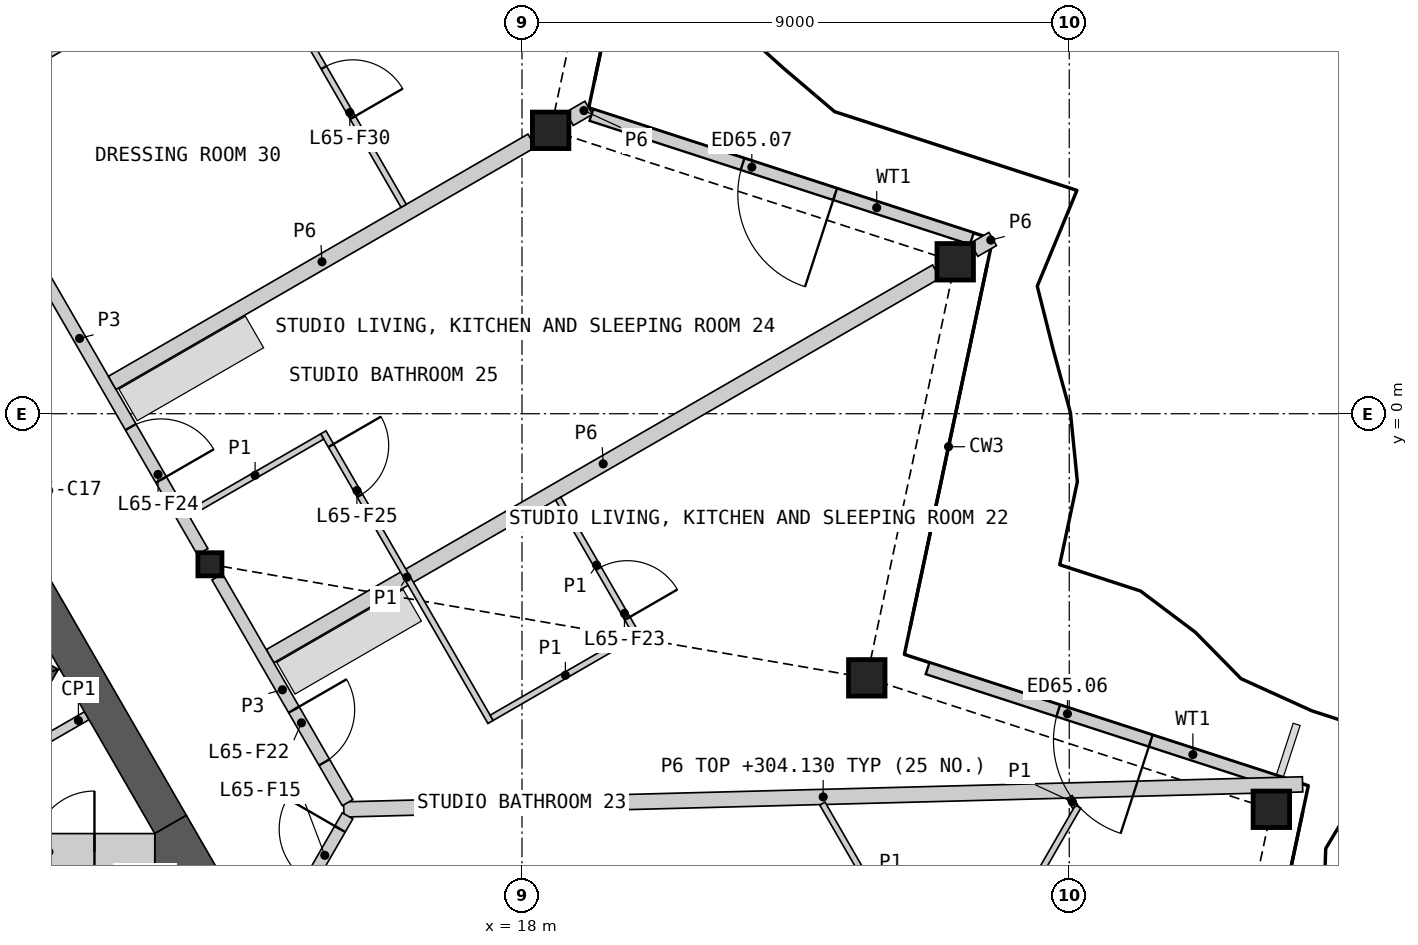
"""IFC4 building model, lengths in metres.
Left out: names, types, materials, properties, quantities, classifications, styles, units other than length and angle.
Written with IfcOpenShell. Run it as: python <this file> out.ifc"""

import sys

from ifc_helpers import new_model, si_unit, direction, frame, frame_2d, origin, origin_2d, place, context, subcontext, project, spatial, polyline, rectangle, hollow_rectangle, i_section, outline, extrude, element, fill, save


model = new_model("IFC4")
c1 = context("Model", 3, precision=1e-05, world=origin(), true_north=direction((0.0, 1.0)))
c2 = subcontext(c1, "Body", "Model", "MODEL_VIEW")
j1 = project(units=[si_unit("LENGTHUNIT", "METRE"), si_unit("PLANEANGLEUNIT", "RADIAN")], contexts=[c1])
p1 = place(None, origin())
s1 = spatial("IfcSite", under=j1, at=p1, CompositionType="ELEMENT")
p2 = place(p1, origin())
s2 = spatial("IfcBuilding", under=s1, at=p2, CompositionType="ELEMENT")
p3 = place(p2, frame((0.0, 0.0, 301.8)))
s3 = spatial("IfcBuildingStorey", under=s2, at=p3, CompositionType="ELEMENT", Elevation=301.8)
for number, where, z_axis, x_axis in (
    (1, (30.324, -6.506, 0.0), (0.0, 0.0, 1.0), (1.0, 0.0, 0.0)),
    (2, (23.67, -4.344, 0.0), (0.0, 0.0, 1.0), (1.0, 0.0, 0.0)),
    (3, (25.125, 2.499, 0.0), (0.0, 0.0, 1.0), (1.0, 0.0, 0.0)),
    (4, (18.471, 4.661, 0.0), (0.0, 0.0, 1.0), (1.0, 0.0, 0.0)),
):
    element("IfcColumn", number, at=place(p3, frame(where, z_axis=z_axis, x_axis=x_axis)), inside=s3, PredefinedType="COLUMN", context=c2, shape_type="SweptSolid", body=[
        extrude(hollow_rectangle(XDim=0.6, YDim=0.6, WallThickness=0.04, at=origin_2d()), origin(), (0.0, 0.0, 1.0), 3.4),
    ])
p4 = place(p3, frame((12.868, -2.476, 0.0), z_axis=(0.0, 0.0, 1.0), x_axis=(1.0, 0.0, 0.0)))
e5 = element("IfcColumn", 5, at=p4, inside=s3, PredefinedType="COLUMN", context=c2, shape_type="SweptSolid", body=[
    extrude(i_section(OverallWidth=0.396, OverallDepth=0.381, WebThickness=0.019, FlangeThickness=0.03, at=origin_2d()), origin(), (0.0, 0.0, 1.0), 3.4),
])
p5 = place(p3, frame((30.488, -6.078, 0.0), z_axis=(0.0, 0.0, 1.0), x_axis=(-0.951062515241, 0.308998530908, 0.0)))
e6 = element("IfcWall", 6, at=p5, inside=s3, PredefinedType="SOLIDWALL", context=c2, shape_type="SweptSolid", body=[
    extrude(rectangle(XDim=6.117, YDim=0.2, at=frame_2d((3.059, 0.0))), origin(), (0.0, 0.0, 1.0), 2.488),
])
p6 = place(p5, frame((2.259, 0.0, 0.0)))
e7 = element("IfcOpeningElement", 7, at=p6, cuts=e6, PredefinedType="OPENING", context=c2, shape_type="SweptSolid", body=[
    extrude(rectangle(XDim=1.6, YDim=2.25, at=frame_2d((0.8, 1.125))), frame((0.0, 0.11, 0.0), z_axis=(0.0, -1.0, 0.0), x_axis=(1.0, 0.0, 0.0)), (0.0, 0.0, 1.0), 0.22),
])
p7 = place(p3, frame((25.398, 2.88, 0.0), z_axis=(0.0, 0.0, 1.0), x_axis=(-0.95105697409, 0.309015585424, 0.0)))
e8 = element("IfcWall", 8, at=p7, inside=s3, PredefinedType="SOLIDWALL", context=c2, shape_type="SweptSolid", body=[
    extrude(rectangle(XDim=6.579, YDim=0.2, at=frame_2d((3.29, 0.0))), origin(), (0.0, 0.0, 1.0), 2.488),
])
p8 = place(p7, frame((2.364, 0.0, 0.0)))
e9 = element("IfcOpeningElement", 9, at=p8, cuts=e8, PredefinedType="OPENING", context=c2, shape_type="SweptSolid", body=[
    extrude(rectangle(XDim=1.6, YDim=2.25, at=frame_2d((0.8, 1.125))), frame((0.0, 0.11, 0.0), z_axis=(0.0, -1.0, 0.0), x_axis=(1.0, 0.0, 0.0)), (0.0, 0.0, 1.0), 0.22),
])
p9 = place(p3, origin())
e10 = element("IfcWall", 10, at=p9, inside=s3, PredefinedType="SHEAR", context=c2, shape_type="SweptSolid", body=[
    extrude(outline(polyline([(8.83, -6.881), (10.374, -4.206), (10.032, -4.298), (8.738, -6.539), (8.83, -6.881)])), origin(), (0.0, 0.0, 1.0), 3.1),
])
p10 = place(p3, origin())
e11 = element("IfcWall", 11, at=p10, inside=s3, PredefinedType="SHEAR", context=c2, shape_type="SweptSolid", body=[
    extrude(outline(polyline([(10.032, -4.298), (10.374, -4.206), (5.307, -1.281), (5.182, -1.498), (10.032, -4.298)])), origin(), (0.0, 0.0, 1.0), 3.1),
])
p11 = place(p3, frame((10.842, -4.967, 0.0), z_axis=(0.0, 0.0, 1.0), x_axis=(-0.866098216386, -0.499873863663, 0.0)))
e12 = element("IfcWall", 12, at=p11, inside=s3, PredefinedType="PARTITIONING", context=c2, shape_type="SweptSolid", body=[
    extrude(rectangle(XDim=1.582, YDim=0.15, at=frame_2d((0.791, 0.0))), origin(), (0.0, 0.0, 1.0), 3.1),
])
p12 = place(p3, frame((12.221, -6.756, 0.0), z_axis=(0.0, 0.0, 1.0), x_axis=(-0.500020646047, 0.866013483456, 0.0)))
e13 = element("IfcWall", 13, at=p12, inside=s3, PredefinedType="SHEAR", context=c2, shape_type="SweptSolid", body=[
    extrude(rectangle(XDim=4.559, YDim=0.6, at=frame_2d((2.28, 0.0))), origin(), (0.0, 0.0, 1.0), 3.1),
])
p13 = place(p3, origin())
e14 = element("IfcWall", 14, at=p13, inside=s3, PredefinedType="SHEAR", context=c2, shape_type="SweptSolid", body=[
    extrude(outline(polyline([(11.961, -7.506), (11.961, -6.906), (12.48, -6.606), (13.0, -7.506), (11.961, -7.506)])), origin(), (0.0, 0.0, 1.0), 3.1),
])
p14 = place(p3, frame((9.369, -7.206, 0.0), z_axis=(0.0, 0.0, 1.0), x_axis=(1.0, 0.0, 0.0)))
e15 = element("IfcWall", 15, at=p14, inside=s3, PredefinedType="SHEAR", context=c2, shape_type="SweptSolid", body=[
    extrude(rectangle(XDim=2.592, YDim=0.6, at=frame_2d((1.296, 0.0))), origin(), (0.0, 0.0, 1.0), 3.1),
])
p15 = place(p14, frame((0.6, 0.0, 0.0)))
e16 = element("IfcOpeningElement", 16, at=p15, cuts=e15, PredefinedType="OPENING", context=c2, shape_type="SweptSolid", body=[
    extrude(rectangle(XDim=1.0, YDim=2.1, at=frame_2d((0.5, 1.05))), frame((0.0, 0.31, 0.0), z_axis=(0.0, -1.0, 0.0), x_axis=(1.0, 0.0, 0.0)), (0.0, 0.0, 1.0), 0.62),
])
p16 = place(p3, frame((15.069, -6.509, 0.0), z_axis=(0.0, 0.0, 1.0), x_axis=(0.999657828615, 0.026157708023, 0.0)))
e17 = element("IfcWall", 17, at=p16, inside=s3, PredefinedType="PARTITIONING", context=c2, shape_type="SweptSolid", body=[
    extrude(rectangle(XDim=15.773, YDim=0.25, at=frame_2d((7.887, 0.0))), origin(), (0.0, 0.0, 1.0), 2.33),
])
p17 = place(p3, frame((13.856, -3.988, 0.0), z_axis=(0.0, 0.0, 1.0), x_axis=(0.866021406514, 0.500006923412, 0.0)))
e18 = element("IfcWall", 18, at=p17, inside=s3, PredefinedType="PARTITIONING", context=c2, shape_type="SweptSolid", body=[
    extrude(rectangle(XDim=12.654, YDim=0.25, at=frame_2d((6.327, 0.0))), origin(), (0.0, 0.0, 1.0), 2.33),
])
p18 = place(p3, frame((8.698, 4.745, 0.0), z_axis=(0.0, 0.0, 1.0), x_axis=(0.499984266882, -0.866034487114, 0.0)))
e19 = element("IfcWall", 19, at=p18, inside=s3, PredefinedType="PARTITIONING", context=c2, shape_type="SweptSolid", body=[
    extrude(rectangle(XDim=8.099, YDim=0.2, at=frame_2d((4.049, 0.0))), origin(), (0.0, 0.0, 1.0), 3.1),
])
p19 = place(p18, frame((5.732, 0.0, 0.0)))
e20 = element("IfcOpeningElement", 20, at=p19, cuts=e19, PredefinedType="OPENING", context=c2, shape_type="SweptSolid", body=[
    extrude(rectangle(XDim=1.0, YDim=2.1, at=frame_2d((0.5, 1.05))), frame((0.0, 0.11, 0.0), z_axis=(0.0, -1.0, 0.0), x_axis=(1.0, 0.0, 0.0)), (0.0, 0.0, 1.0), 0.22),
])
p20 = place(p3, frame((11.26, 0.507, 0.0), z_axis=(0.0, 0.0, 1.0), x_axis=(0.86602842894, 0.499994760241, 0.0)))
e21 = element("IfcWall", 21, at=p20, inside=s3, PredefinedType="PARTITIONING", context=c2, shape_type="SweptSolid", body=[
    extrude(rectangle(XDim=7.968, YDim=0.25, at=frame_2d((3.984, 0.0))), origin(), (0.0, 0.0, 1.0), 2.33),
])
p21 = place(p3, frame((12.988, -2.684, 0.0), z_axis=(0.0, 0.0, 1.0), x_axis=(0.500003406062, -0.866023437285, 0.0)))
e22 = element("IfcWall", 22, at=p21, inside=s3, PredefinedType="PARTITIONING", context=c2, shape_type="SweptSolid", body=[
    extrude(rectangle(XDim=4.288, YDim=0.2, at=frame_2d((2.144, 0.0))), origin(), (0.0, 0.0, 1.0), 3.1),
])
p22 = place(p21, frame((2.521, 0.0, 0.0)))
e23 = element("IfcOpeningElement", 23, at=p22, cuts=e22, PredefinedType="OPENING", context=c2, shape_type="SweptSolid", body=[
    extrude(rectangle(XDim=1.0, YDim=2.1, at=frame_2d((0.5, 1.05))), frame((0.0, 0.11, 0.0), z_axis=(0.0, -1.0, 0.0), x_axis=(1.0, 0.0, 0.0)), (0.0, 0.0, 1.0), 0.22),
])
p23 = place(p3, frame((13.293, -9.797, 0.0), z_axis=(0.0, 0.0, 1.0), x_axis=(0.499967746641, 0.866044024469, 0.0)))
e24 = element("IfcWall", 24, at=p23, inside=s3, PredefinedType="PARTITIONING", context=c2, shape_type="SweptSolid", body=[
    extrude(rectangle(XDim=3.676, YDim=0.2, at=frame_2d((1.838, 0.0))), origin(), (0.0, 0.0, 1.0), 3.1),
])
p24 = place(p23, frame((2.426, 0.0, 0.0)))
e25 = element("IfcOpeningElement", 25, at=p24, cuts=e24, PredefinedType="OPENING", context=c2, shape_type="SweptSolid", body=[
    extrude(rectangle(XDim=1.0, YDim=2.1, at=frame_2d((0.5, 1.05))), frame((0.0, 0.11, 0.0), z_axis=(0.0, -1.0, 0.0), x_axis=(1.0, 0.0, 0.0)), (0.0, 0.0, 1.0), 0.22),
])
p25 = place(p3, frame((18.781, 4.849, 0.0), z_axis=(0.0, 0.0, 1.0), x_axis=(0.86609656662, 0.499876722092, 0.0)))
e26 = element("IfcWall", 26, at=p25, inside=s3, PredefinedType="PARTITIONING", context=c2, shape_type="SweptSolid", body=[
    extrude(rectangle(XDim=0.365, YDim=0.25, at=frame_2d((0.183, 0.0))), origin(), (0.0, 0.0, 1.0), 2.33),
])
p26 = place(p3, frame((25.435, 2.697, 0.0), z_axis=(0.0, 0.0, 1.0), x_axis=(0.865851769275, 0.500300623268, 0.0)))
e27 = element("IfcWall", 27, at=p26, inside=s3, PredefinedType="PARTITIONING", context=c2, shape_type="SweptSolid", body=[
    extrude(rectangle(XDim=0.353, YDim=0.25, at=frame_2d((0.177, 0.0))), origin(), (0.0, 0.0, 1.0), 2.33),
])
p27 = place(p3, frame((8.786, 5.073, 0.0), z_axis=(0.0, 0.0, 1.0), x_axis=(0.86602139559, 0.500006942333, 0.0)))
e28 = element("IfcWall", 28, at=p27, inside=s3, PredefinedType="PARTITIONING", context=c2, shape_type="SweptSolid", body=[
    extrude(rectangle(XDim=12.505, YDim=0.1, at=frame_2d((6.252, 0.0))), origin(), (0.0, 0.0, 1.0), 2.33),
])
p28 = place(p27, frame((5.677, 0.0, 0.0)))
e29 = element("IfcOpeningElement", 29, at=p28, cuts=e28, PredefinedType="OPENING", context=c2, shape_type="SweptSolid", body=[
    extrude(rectangle(XDim=0.95, YDim=2.1, at=frame_2d((0.475, 1.05))), frame((0.0, 0.06, 0.0), z_axis=(0.0, -1.0, 0.0), x_axis=(1.0, 0.0, 0.0)), (0.0, 0.0, 1.0), 0.12),
])
p29 = place(p3, frame((23.183, -13.327, 0.0), z_axis=(0.0, 0.0, 1.0), x_axis=(0.499991741039, 0.866030172045, 0.0)))
e30 = element("IfcWall", 30, at=p29, inside=s3, PredefinedType="PARTITIONING", context=c2, shape_type="SweptSolid", body=[
    extrude(rectangle(XDim=7.927, YDim=0.1, at=frame_2d((3.963, 0.0))), origin(), (0.0, 0.0, 1.0), 2.33),
])
p30 = place(p29, frame((1.97, 0.0, 0.0)))
e31 = element("IfcOpeningElement", 31, at=p30, cuts=e30, PredefinedType="OPENING", context=c2, shape_type="SweptSolid", body=[
    extrude(rectangle(XDim=0.95, YDim=2.1, at=frame_2d((0.475, 1.05))), frame((0.0, 0.06, 0.0), z_axis=(0.0, -1.0, 0.0), x_axis=(1.0, 0.0, 0.0)), (0.0, 0.0, 1.0), 0.12),
])
p31 = place(p3, frame((14.733, -0.307, 0.0), z_axis=(0.0, 0.0, 1.0), x_axis=(0.499996545922, -0.866027397988, 0.0)))
e32 = element("IfcWall", 32, at=p31, inside=s3, PredefinedType="PARTITIONING", context=c2, shape_type="SweptSolid", body=[
    extrude(rectangle(XDim=5.5, YDim=0.1, at=frame_2d((2.75, 0.0))), origin(), (0.0, 0.0, 1.0), 2.33),
])
p32 = place(p31, frame((0.25, 0.0, 0.0)))
e33 = element("IfcOpeningElement", 33, at=p32, cuts=e32, PredefinedType="OPENING", context=c2, shape_type="SweptSolid", body=[
    extrude(rectangle(XDim=0.95, YDim=2.1, at=frame_2d((0.475, 1.05))), frame((0.0, 0.06, 0.0), z_axis=(0.0, -1.0, 0.0), x_axis=(1.0, 0.0, 0.0)), (0.0, 0.0, 1.0), 0.12),
])
p33 = place(p3, frame((13.546, 7.763, 0.0), z_axis=(0.0, 0.0, 1.0), x_axis=(0.500028620461, -0.866008879123, 0.0)))
e34 = element("IfcWall", 34, at=p33, inside=s3, PredefinedType="PARTITIONING", context=c2, shape_type="SweptSolid", body=[
    extrude(rectangle(XDim=5.016, YDim=0.1, at=frame_2d((2.508, 0.0))), origin(), (0.0, 0.0, 1.0), 2.33),
])
p34 = place(p33, frame((2.39, 0.0, 0.0)))
e35 = element("IfcOpeningElement", 35, at=p34, cuts=e34, PredefinedType="OPENING", context=c2, shape_type="SweptSolid", body=[
    extrude(rectangle(XDim=0.95, YDim=2.1, at=frame_2d((0.475, 1.05))), frame((0.0, 0.06, 0.0), z_axis=(0.0, -1.0, 0.0), x_axis=(1.0, 0.0, 0.0)), (0.0, 0.0, 1.0), 0.12),
])
p35 = place(p3, frame((22.941, -6.413, 0.0), z_axis=(0.0, 0.0, 1.0), x_axis=(0.500013199183, -0.866017783098, 0.0)))
e36 = element("IfcWall", 36, at=p35, inside=s3, PredefinedType="PARTITIONING", context=c2, shape_type="SweptSolid", body=[
    extrude(rectangle(XDim=3.077, YDim=0.1, at=frame_2d((1.539, 0.0))), origin(), (0.0, 0.0, 1.0), 2.33),
])
p36 = place(p3, frame((17.501, -5.001, 0.0), z_axis=(0.0, 0.0, 1.0), x_axis=(0.866034573852, 0.49998411664, 0.0)))
e37 = element("IfcWall", 37, at=p36, inside=s3, PredefinedType="PARTITIONING", context=c2, shape_type="SweptSolid", body=[
    extrude(rectangle(XDim=2.8, YDim=0.1, at=frame_2d((1.4, 0.0))), origin(), (0.0, 0.0, 1.0), 2.33),
])
p37 = place(p3, frame((18.595, -1.396, 0.0), z_axis=(0.0, 0.0, 1.0), x_axis=(0.499976333282, -0.866039067339, 0.0)))
e38 = element("IfcWall", 38, at=p37, inside=s3, PredefinedType="PARTITIONING", context=c2, shape_type="SweptSolid", body=[
    extrude(rectangle(XDim=2.525, YDim=0.1, at=frame_2d((1.262, 0.0))), origin(), (0.0, 0.0, 1.0), 2.33),
])
p38 = place(p37, frame((1.325, 0.0, 0.0)))
e39 = element("IfcOpeningElement", 39, at=p38, cuts=e38, PredefinedType="OPENING", context=c2, shape_type="SweptSolid", body=[
    extrude(rectangle(XDim=0.95, YDim=2.1, at=frame_2d((0.475, 1.05))), frame((0.0, 0.06, 0.0), z_axis=(0.0, -1.0, 0.0), x_axis=(1.0, 0.0, 0.0)), (0.0, 0.0, 1.0), 0.12),
])
p39 = place(p3, frame((12.506, -1.65, 0.0), z_axis=(0.0, 0.0, 1.0), x_axis=(0.866030925526, 0.499990435942, 0.0)))
e40 = element("IfcWall", 40, at=p39, inside=s3, PredefinedType="PARTITIONING", context=c2, shape_type="SweptSolid", body=[
    extrude(rectangle(XDim=2.55, YDim=0.1, at=frame_2d((1.275, 0.0))), origin(), (0.0, 0.0, 1.0), 2.33),
])
p40 = place(p3, frame((27.006, -6.306, 0.0), z_axis=(0.0, 0.0, 1.0), x_axis=(0.500074377092, -0.865982457891, 0.0)))
e41 = element("IfcWall", 41, at=p40, inside=s3, PredefinedType="PARTITIONING", context=c2, shape_type="SweptSolid", body=[
    extrude(rectangle(XDim=0.18, YDim=0.1, at=frame_2d((0.09, 0.0))), origin(), (0.0, 0.0, 1.0), 2.33),
])
p41 = place(p6, origin())
e42 = element("IfcDoor", 42, at=p41, inside=s3, OperationType="DOUBLE_DOOR_SINGLE_SWING", PredefinedType="DOOR", context=c2, shape_type="SweptSolid", body=[
    extrude(rectangle(XDim=1.6, YDim=2.25, at=frame_2d((0.8, 1.125))), frame((0.0, 0.025, 0.0), z_axis=(0.0, -1.0, 0.0), x_axis=(1.0, 0.0, 0.0)), (0.0, 0.0, 1.0), 0.05),
])
fill(e7, e42)
p42 = place(p8, origin())
e43 = element("IfcDoor", 43, at=p42, inside=s3, OperationType="DOUBLE_DOOR_SINGLE_SWING", PredefinedType="DOOR", context=c2, shape_type="SweptSolid", body=[
    extrude(rectangle(XDim=1.6, YDim=2.25, at=frame_2d((0.8, 1.125))), frame((0.0, 0.025, 0.0), z_axis=(0.0, -1.0, 0.0), x_axis=(1.0, 0.0, 0.0)), (0.0, 0.0, 1.0), 0.05),
])
fill(e9, e43)
p43 = place(p15, origin())
e44 = element("IfcDoor", 44, at=p43, inside=s3, OperationType="SINGLE_SWING_RIGHT", PredefinedType="DOOR", context=c2, shape_type="SweptSolid", body=[
    extrude(rectangle(XDim=1.0, YDim=2.1, at=frame_2d((0.5, 1.05))), frame((0.0, 0.055, 0.0), z_axis=(0.0, -1.0, 0.0), x_axis=(1.0, 0.0, 0.0)), (0.0, 0.0, 1.0), 0.05),
])
fill(e16, e44)
p44 = place(p24, origin())
e45 = element("IfcDoor", 45, at=p44, inside=s3, OperationType="SINGLE_SWING_RIGHT", PredefinedType="DOOR", context=c2, shape_type="SweptSolid", body=[
    extrude(rectangle(XDim=1.0, YDim=2.1, at=frame_2d((0.5, 1.05))), frame((0.0, 0.025, 0.0), z_axis=(0.0, -1.0, 0.0), x_axis=(1.0, 0.0, 0.0)), (0.0, 0.0, 1.0), 0.05),
])
fill(e25, e45)
p45 = place(p22, origin())
e46 = element("IfcDoor", 46, at=p45, inside=s3, OperationType="SINGLE_SWING_LEFT", PredefinedType="DOOR", context=c2, shape_type="SweptSolid", body=[
    extrude(rectangle(XDim=1.0, YDim=2.1, at=frame_2d((0.5, 1.05))), frame((0.0, 0.025, 0.0), z_axis=(0.0, -1.0, 0.0), x_axis=(1.0, 0.0, 0.0)), (0.0, 0.0, 1.0), 0.05),
])
fill(e23, e46)
p46 = place(p38, origin())
e47 = element("IfcDoor", 47, at=p46, inside=s3, OperationType="SINGLE_SWING_RIGHT", PredefinedType="DOOR", context=c2, shape_type="SweptSolid", body=[
    extrude(rectangle(XDim=0.95, YDim=2.1, at=frame_2d((0.475, 1.05))), frame((0.0, 0.025, 0.0), z_axis=(0.0, -1.0, 0.0), x_axis=(1.0, 0.0, 0.0)), (0.0, 0.0, 1.0), 0.05),
])
fill(e39, e47)
p47 = place(p19, origin())
e48 = element("IfcDoor", 48, at=p47, inside=s3, OperationType="SINGLE_SWING_RIGHT", PredefinedType="DOOR", context=c2, shape_type="SweptSolid", body=[
    extrude(rectangle(XDim=1.0, YDim=2.1, at=frame_2d((0.5, 1.05))), frame((0.0, 0.025, 0.0), z_axis=(0.0, -1.0, 0.0), x_axis=(1.0, 0.0, 0.0)), (0.0, 0.0, 1.0), 0.05),
])
fill(e20, e48)
p48 = place(p32, origin())
e49 = element("IfcDoor", 49, at=p48, inside=s3, OperationType="SINGLE_SWING_LEFT", PredefinedType="DOOR", context=c2, shape_type="SweptSolid", body=[
    extrude(rectangle(XDim=0.95, YDim=2.1, at=frame_2d((0.475, 1.05))), frame((0.0, 0.025, 0.0), z_axis=(0.0, -1.0, 0.0), x_axis=(1.0, 0.0, 0.0)), (0.0, 0.0, 1.0), 0.05),
])
fill(e33, e49)
p49 = place(p34, origin())
e50 = element("IfcDoor", 50, at=p49, inside=s3, OperationType="SINGLE_SWING_RIGHT", PredefinedType="DOOR", context=c2, shape_type="SweptSolid", body=[
    extrude(rectangle(XDim=0.95, YDim=2.1, at=frame_2d((0.475, 1.05))), frame((0.0, 0.025, 0.0), z_axis=(0.0, -1.0, 0.0), x_axis=(1.0, 0.0, 0.0)), (0.0, 0.0, 1.0), 0.05),
])
fill(e35, e50)
save(model, sys.argv[1])
